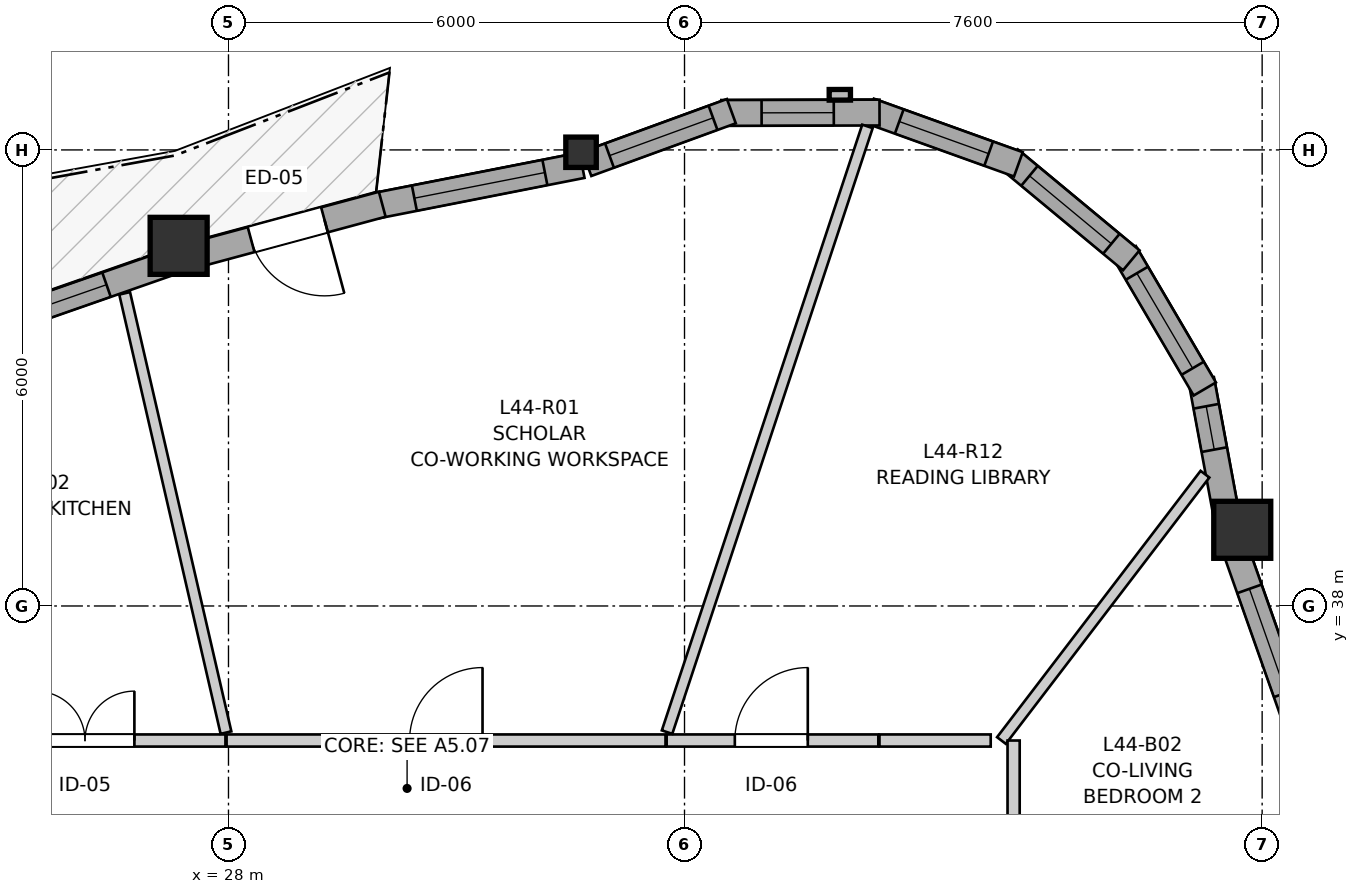
"""IFC4 building model, lengths in metres.
Left out: names, types, materials, properties, quantities, classifications, styles, units other than length and angle.
Written with IfcOpenShell. Run it as: python <this file> out.ifc"""

import sys

from ifc_helpers import new_model, si_unit, direction, frame, frame_2d, origin, origin_2d, place, context, subcontext, project, spatial, rectangle, i_section, extrude, source, transform, mapped, element, fill, save


model = new_model("IFC4")
c1 = context("Model", 3, precision=1e-05, world=origin(), true_north=direction((0.0, 1.0)))
c2 = subcontext(c1, "Body", "Model", "MODEL_VIEW")
j1 = project(units=[si_unit("LENGTHUNIT", "METRE"), si_unit("PLANEANGLEUNIT", "RADIAN")], contexts=[c1])
p1 = place(None, origin())
s1 = spatial("IfcSite", under=j1, at=p1, CompositionType="ELEMENT")
p2 = place(p1, origin())
s2 = spatial("IfcBuilding", under=s1, at=p2, CompositionType="ELEMENT")
p3 = place(p2, frame((0.0, 0.0, 149.0)))
s3 = spatial("IfcBuildingStorey", under=s2, at=p3, CompositionType="ELEMENT", Elevation=149.0)
m1 = source(origin(), c2, "Body", "SweptSolid", [
    extrude(rectangle(XDim=0.75, YDim=0.75, at=origin_2d()), origin(), (0.0, 0.0, 1.0), 2.935),
])
p4 = place(p3, frame((41.338, 39.002, 0.0), z_axis=(0.0, 0.0, 1.0), x_axis=(1.0, 0.0, 0.0)))
e1 = element("IfcColumn", 1, at=p4, inside=s3, PredefinedType="COLUMN", context=c2, shape_type="MappedRepresentation", body=[
    mapped(m1, transform((0.0, 0.0, 0.0), x_axis=(1.0, 0.0, 0.0), y_axis=(0.0, 1.0, 0.0), z_axis=(0.0, 0.0, 1.0), scale=1.0)),
])
m2 = source(origin(), c2, "Body", "SweptSolid", [
    extrude(i_section(OverallWidth=0.401, OverallDepth=0.399, WebThickness=0.023, FlangeThickness=0.036, FilletRadius=0.015, at=origin_2d()), origin(), (0.0, 0.0, 1.0), 2.935),
])
p5 = place(p3, frame((32.639, 43.969, 0.0), z_axis=(0.0, 0.0, 1.0), x_axis=(1.0, 0.0, 0.0)))
e2 = element("IfcColumn", 2, at=p5, inside=s3, PredefinedType="PILASTER", context=c2, shape_type="MappedRepresentation", body=[
    mapped(m2, transform((0.0, 0.0, 0.0), x_axis=(1.0, 0.0, 0.0), y_axis=(0.0, 1.0, 0.0), z_axis=(0.0, 0.0, 1.0), scale=1.0)),
])
p6 = place(p3, frame((27.344, 42.738, 0.0), z_axis=(0.0, 0.0, 1.0), x_axis=(1.0, 0.0, 0.0)))
e3 = element("IfcColumn", 3, at=p6, inside=s3, PredefinedType="COLUMN", context=c2, shape_type="MappedRepresentation", body=[
    mapped(m1, transform((0.0, 0.0, 0.0), x_axis=(1.0, 0.0, 0.0), y_axis=(0.0, 1.0, 0.0), z_axis=(0.0, 0.0, 1.0), scale=1.0)),
])
p7 = place(p3, frame((42.121, 36.274, 0.0), z_axis=(0.0, 0.0, 1.0), x_axis=(-0.332724751299, 0.943023986902, 0.0)))
e4 = element("IfcWall", 4, at=p7, inside=s3, PredefinedType="SOLIDWALL", context=c2, shape_type="SweptSolid", body=[
    extrude(rectangle(XDim=2.678, YDim=0.34, at=frame_2d((1.339, 0.0))), origin(), (0.0, 0.0, 1.0), 2.515),
])
p8 = place(p7, frame((0.619, 0.0, 0.82)))
e5 = element("IfcOpeningElement", 5, at=p8, cuts=e4, PredefinedType="OPENING", context=c2, shape_type="SweptSolid", body=[
    extrude(rectangle(XDim=1.45, YDim=1.25, at=frame_2d((0.725, 0.625))), frame((0.0, 0.18, 0.0), z_axis=(0.0, -1.0, 0.0), x_axis=(1.0, 0.0, 0.0)), (0.0, 0.0, 1.0), 0.36),
])
p9 = place(p3, frame((41.143, 39.124, 0.0), z_axis=(0.0, 0.0, 1.0), x_axis=(-0.182320770307, 0.983239104549, 0.0)))
e6 = element("IfcWall", 6, at=p9, inside=s3, PredefinedType="SOLIDWALL", context=c2, shape_type="SweptSolid", body=[
    extrude(rectangle(XDim=1.888, YDim=0.34, at=frame_2d((0.944, 0.0))), origin(), (0.0, 0.0, 1.0), 2.515),
])
p10 = place(p9, frame((0.949, 0.0, 0.82)))
e7 = element("IfcOpeningElement", 7, at=p10, cuts=e6, PredefinedType="OPENING", context=c2, shape_type="SweptSolid", body=[
    extrude(rectangle(XDim=0.58, YDim=1.35, at=frame_2d((0.29, 0.675))), frame((0.0, 0.18, 0.0), z_axis=(0.0, -1.0, 0.0), x_axis=(1.0, 0.0, 0.0)), (0.0, 0.0, 1.0), 0.36),
])
p11 = place(p3, frame((40.845, 40.855, 0.0), z_axis=(0.0, 0.0, 1.0), x_axis=(-0.506225227923, 0.862401309493, 0.0)))
e8 = element("IfcWall", 8, at=p11, inside=s3, PredefinedType="SOLIDWALL", context=c2, shape_type="SweptSolid", body=[
    extrude(rectangle(XDim=2.081, YDim=0.34, at=frame_2d((1.041, 0.0))), origin(), (0.0, 0.0, 1.0), 2.515),
])
p12 = place(p11, frame((0.316, 0.0, 0.82)))
e9 = element("IfcOpeningElement", 9, at=p12, cuts=e8, PredefinedType="OPENING", context=c2, shape_type="SweptSolid", body=[
    extrude(rectangle(XDim=1.45, YDim=1.25, at=frame_2d((0.725, 0.625))), frame((0.0, 0.18, 0.0), z_axis=(0.0, -1.0, 0.0), x_axis=(1.0, 0.0, 0.0)), (0.0, 0.0, 1.0), 0.36),
])
p13 = place(p3, frame((39.878, 42.548, 0.0), z_axis=(0.0, 0.0, 1.0), x_axis=(-0.769690471148, 0.63841724493, 0.0)))
e10 = element("IfcWall", 10, at=p13, inside=s3, PredefinedType="SOLIDWALL", context=c2, shape_type="SweptSolid", body=[
    extrude(rectangle(XDim=2.081, YDim=0.34, at=frame_2d((1.041, 0.0))), origin(), (0.0, 0.0, 1.0), 2.515),
])
p14 = place(p13, frame((0.341, 0.0, 0.82)))
e11 = element("IfcOpeningElement", 11, at=p14, cuts=e10, PredefinedType="OPENING", context=c2, shape_type="SweptSolid", body=[
    extrude(rectangle(XDim=1.4, YDim=1.35, at=frame_2d((0.7, 0.675))), frame((0.0, 0.18, 0.0), z_axis=(0.0, -1.0, 0.0), x_axis=(1.0, 0.0, 0.0)), (0.0, 0.0, 1.0), 0.36),
])
p15 = place(p3, frame((38.393, 43.81, 0.0), z_axis=(0.0, 0.0, 1.0), x_axis=(-0.941033874027, 0.338312352617, 0.0)))
e12 = element("IfcWall", 12, at=p15, inside=s3, PredefinedType="SOLIDWALL", context=c2, shape_type="SweptSolid", body=[
    extrude(rectangle(XDim=2.081, YDim=0.34, at=frame_2d((1.041, 0.0))), origin(), (0.0, 0.0, 1.0), 2.515),
])
p16 = place(p15, frame((0.416, 0.0, 0.82)))
e13 = element("IfcOpeningElement", 13, at=p16, cuts=e12, PredefinedType="OPENING", context=c2, shape_type="SweptSolid", body=[
    extrude(rectangle(XDim=1.25, YDim=1.35, at=frame_2d((0.625, 0.675))), frame((0.0, 0.18, 0.0), z_axis=(0.0, -1.0, 0.0), x_axis=(1.0, 0.0, 0.0)), (0.0, 0.0, 1.0), 0.36),
])
p17 = place(p3, frame((36.566, 44.491, 0.0), z_axis=(0.0, 0.0, 1.0), x_axis=(-0.999996965984, -0.002463335635, 0.0)))
e14 = element("IfcWall", 14, at=p17, inside=s3, PredefinedType="SOLIDWALL", context=c2, shape_type="SweptSolid", body=[
    extrude(rectangle(XDim=2.081, YDim=0.34, at=frame_2d((1.041, 0.0))), origin(), (0.0, 0.0, 1.0), 2.515),
])
p18 = place(p17, frame((0.602, 0.0, 0.82)))
e15 = element("IfcOpeningElement", 15, at=p18, cuts=e14, PredefinedType="OPENING", context=c2, shape_type="SweptSolid", body=[
    extrude(rectangle(XDim=0.95, YDim=1.35, at=frame_2d((0.475, 0.675))), frame((0.0, 0.18, 0.0), z_axis=(0.0, -1.0, 0.0), x_axis=(1.0, 0.0, 0.0)), (0.0, 0.0, 1.0), 0.36),
])
p19 = place(p3, frame((34.616, 44.51, 0.0), z_axis=(0.0, 0.0, 1.0), x_axis=(-0.939426417976, -0.342750645819, 0.0)))
e16 = element("IfcWall", 16, at=p19, inside=s3, PredefinedType="SOLIDWALL", context=c2, shape_type="SweptSolid", body=[
    extrude(rectangle(XDim=2.023, YDim=0.34, at=frame_2d((1.011, 0.0))), origin(), (0.0, 0.0, 1.0), 2.515),
])
p20 = place(p19, frame((0.257, 0.0, 0.82)))
e17 = element("IfcOpeningElement", 17, at=p20, cuts=e16, PredefinedType="OPENING", context=c2, shape_type="SweptSolid", body=[
    extrude(rectangle(XDim=1.45, YDim=1.25, at=frame_2d((0.725, 0.625))), frame((0.0, 0.18, 0.0), z_axis=(0.0, -1.0, 0.0), x_axis=(1.0, 0.0, 0.0)), (0.0, 0.0, 1.0), 0.36),
])
p21 = place(p3, frame((32.652, 43.799, 0.0), z_axis=(0.0, 0.0, 1.0), x_axis=(-0.98123033563, -0.192839385083, 0.0)))
e18 = element("IfcWall", 18, at=p21, inside=s3, PredefinedType="SOLIDWALL", context=c2, shape_type="SweptSolid", body=[
    extrude(rectangle(XDim=2.766, YDim=0.34, at=frame_2d((1.383, 0.0))), origin(), (0.0, 0.0, 1.0), 2.515),
])
p22 = place(p21, frame((0.498, 0.0, 0.82)))
e19 = element("IfcOpeningElement", 19, at=p22, cuts=e18, PredefinedType="OPENING", context=c2, shape_type="SweptSolid", body=[
    extrude(rectangle(XDim=1.75, YDim=1.3, at=frame_2d((0.875, 0.65))), frame((0.0, 0.18, 0.0), z_axis=(0.0, -1.0, 0.0), x_axis=(1.0, 0.0, 0.0)), (0.0, 0.0, 1.0), 0.36),
])
p23 = place(p3, frame((30.023, 43.285, 0.0), z_axis=(0.0, 0.0, 1.0), x_axis=(-0.965478241218, -0.260483714913, 0.0)))
e20 = element("IfcWall", 20, at=p23, inside=s3, PredefinedType="SOLIDWALL", context=c2, shape_type="SweptSolid", body=[
    extrude(rectangle(XDim=2.574, YDim=0.34, at=frame_2d((1.287, 0.0))), origin(), (0.0, 0.0, 1.0), 2.515),
])
p24 = place(p23, frame((0.787, 0.0, 0.0)))
e21 = element("IfcOpeningElement", 21, at=p24, cuts=e20, PredefinedType="OPENING", context=c2, shape_type="SweptSolid", body=[
    extrude(rectangle(XDim=1.0, YDim=2.1, at=frame_2d((0.5, 1.05))), frame((0.0, 0.18, 0.0), z_axis=(0.0, -1.0, 0.0), x_axis=(1.0, 0.0, 0.0)), (0.0, 0.0, 1.0), 0.36),
])
p25 = place(p3, frame((27.254, 42.527, 0.0), z_axis=(0.0, 0.0, 1.0), x_axis=(-0.944140843313, -0.329542209721, 0.0)))
e22 = element("IfcWall", 22, at=p25, inside=s3, PredefinedType="SOLIDWALL", context=c2, shape_type="SweptSolid", body=[
    extrude(rectangle(XDim=2.53, YDim=0.34, at=frame_2d((1.265, 0.0))), origin(), (0.0, 0.0, 1.0), 2.515),
])
p26 = place(p25, frame((0.909, 0.0, 0.82)))
e23 = element("IfcOpeningElement", 23, at=p26, cuts=e22, PredefinedType="OPENING", context=c2, shape_type="SweptSolid", body=[
    extrude(rectangle(XDim=1.35, YDim=1.45, at=frame_2d((0.675, 0.725))), frame((0.0, 0.18, 0.0), z_axis=(0.0, -1.0, 0.0), x_axis=(1.0, 0.0, 0.0)), (0.0, 0.0, 1.0), 0.36),
])
p27 = place(p3, frame((27.975, 36.23, 0.0), z_axis=(0.0, 0.0, 1.0), x_axis=(1.0, 0.0, 0.0)))
e24 = element("IfcWall", 24, at=p27, inside=s3, PredefinedType="PARTITIONING", context=c2, shape_type="SweptSolid", body=[
    extrude(rectangle(XDim=5.775, YDim=0.16, at=frame_2d((2.887, 0.0))), origin(), (0.0, 0.0, 1.0), 2.573),
])
p28 = place(p27, frame((2.407, 0.0, 0.0)))
e25 = element("IfcOpeningElement", 25, at=p28, cuts=e24, PredefinedType="OPENING", context=c2, shape_type="SweptSolid", body=[
    extrude(rectangle(XDim=0.96, YDim=2.1, at=frame_2d((0.48, 1.05))), frame((0.0, 0.09, 0.0), z_axis=(0.0, -1.0, 0.0), x_axis=(1.0, 0.0, 0.0)), (0.0, 0.0, 1.0), 0.18),
])
p29 = place(p3, frame((24.215, 36.23, 0.0), z_axis=(0.0, 0.0, 1.0), x_axis=(1.0, 0.0, 0.0)))
e26 = element("IfcWall", 26, at=p29, inside=s3, PredefinedType="PARTITIONING", context=c2, shape_type="SweptSolid", body=[
    extrude(rectangle(XDim=3.745, YDim=0.16, at=frame_2d((1.873, 0.0))), origin(), (0.0, 0.0, 1.0), 2.935),
])
p30 = place(p29, frame((1.247, 0.0, 0.0)))
e27 = element("IfcOpeningElement", 27, at=p30, cuts=e26, PredefinedType="OPENING", context=c2, shape_type="SweptSolid", body=[
    extrude(rectangle(XDim=1.3, YDim=2.1, at=frame_2d((0.65, 1.05))), frame((0.0, 0.09, 0.0), z_axis=(0.0, -1.0, 0.0), x_axis=(1.0, 0.0, 0.0)), (0.0, 0.0, 1.0), 0.18),
])
p31 = place(p3, frame((33.765, 36.23, 0.0), z_axis=(0.0, 0.0, 1.0), x_axis=(1.0, 0.0, 0.0)))
e28 = element("IfcWall", 28, at=p31, inside=s3, PredefinedType="PARTITIONING", context=c2, shape_type="SweptSolid", body=[
    extrude(rectangle(XDim=2.785, YDim=0.16, at=frame_2d((1.393, 0.0))), origin(), (0.0, 0.0, 1.0), 2.573),
])
p32 = place(p31, frame((0.897, 0.0, 0.0)))
e29 = element("IfcOpeningElement", 29, at=p32, cuts=e28, PredefinedType="OPENING", context=c2, shape_type="SweptSolid", body=[
    extrude(rectangle(XDim=0.96, YDim=2.1, at=frame_2d((0.48, 1.05))), frame((0.0, 0.09, 0.0), z_axis=(0.0, -1.0, 0.0), x_axis=(1.0, 0.0, 0.0)), (0.0, 0.0, 1.0), 0.18),
])
p33 = place(p3, frame((33.771, 36.34, 0.0), z_axis=(0.0, 0.0, 1.0), x_axis=(0.314080540859, 0.949396341816, 0.0)))
e30 = element("IfcWall", 30, at=p33, inside=s3, PredefinedType="PARTITIONING", context=c2, shape_type="SweptSolid", body=[
    extrude(rectangle(XDim=8.394, YDim=0.145, at=frame_2d((4.197, 0.0))), origin(), (0.0, 0.0, 1.0), 2.935),
])
p34 = place(p3, frame((26.634, 42.113, 0.0), z_axis=(0.0, 0.0, 1.0), x_axis=(0.224790361783, -0.97440714963, 0.0)))
e31 = element("IfcWall", 31, at=p34, inside=s3, PredefinedType="PARTITIONING", context=c2, shape_type="SweptSolid", body=[
    extrude(rectangle(XDim=5.931, YDim=0.145, at=frame_2d((2.966, 0.0))), origin(), (0.0, 0.0, 1.0), 2.935),
])
p35 = place(p3, frame((38.17, 36.23, 0.0), z_axis=(0.0, 0.0, 1.0), x_axis=(0.607203490548, 0.794546361811, 0.0)))
e32 = element("IfcWall", 32, at=p35, inside=s3, PredefinedType="PARTITIONING", context=c2, shape_type="SweptSolid", body=[
    extrude(rectangle(XDim=4.41, YDim=0.145, at=frame_2d((2.205, 0.0))), origin(), (0.0, 0.0, 1.0), 2.935),
])
p36 = place(p3, frame((38.33, 34.465, 0.0), z_axis=(0.0, 0.0, 1.0), x_axis=(0.0, 1.0, 0.0)))
e33 = element("IfcWall", 33, at=p36, inside=s3, PredefinedType="PARTITIONING", context=c2, shape_type="SweptSolid", body=[
    extrude(rectangle(XDim=1.765, YDim=0.16, at=frame_2d((0.882, 0.0))), origin(), (0.0, 0.0, 1.0), 2.573),
])
p37 = place(p3, frame((36.565, 36.23, 0.0), z_axis=(0.0, 0.0, 1.0), x_axis=(1.0, 0.0, 0.0)))
e34 = element("IfcWall", 34, at=p37, inside=s3, PredefinedType="PARTITIONING", context=c2, shape_type="SweptSolid", body=[
    extrude(rectangle(XDim=1.464, YDim=0.16, at=frame_2d((0.732, 0.0))), origin(), (0.0, 0.0, 1.0), 2.935),
])
m3 = source(origin(), c2, "Body", "SweptSolid", [
    extrude(rectangle(XDim=1.45, YDim=1.25, at=frame_2d((0.725, 0.625))), frame((0.0, 0.03, 0.0), z_axis=(0.0, -1.0, 0.0), x_axis=(1.0, 0.0, 0.0)), (0.0, 0.0, 1.0), 0.06),
])
p38 = place(p8, origin())
e35 = element("IfcWindow", 35, at=p38, inside=s3, PartitioningType="SINGLE_PANEL", PredefinedType="WINDOW", context=c2, shape_type="MappedRepresentation", body=[
    mapped(m3, transform((0.0, 0.0, 0.0), x_axis=(1.0, 0.0, 0.0), y_axis=(0.0, 1.0, 0.0), z_axis=(0.0, 0.0, 1.0), scale=1.0)),
])
fill(e5, e35)
m4 = source(origin(), c2, "Body", "SweptSolid", [
    extrude(rectangle(XDim=0.58, YDim=1.35, at=frame_2d((0.29, 0.675))), frame((0.0, 0.03, 0.0), z_axis=(0.0, -1.0, 0.0), x_axis=(1.0, 0.0, 0.0)), (0.0, 0.0, 1.0), 0.06),
])
p39 = place(p10, origin())
e36 = element("IfcWindow", 36, at=p39, inside=s3, PartitioningType="SINGLE_PANEL", PredefinedType="WINDOW", context=c2, shape_type="MappedRepresentation", body=[
    mapped(m4, transform((0.0, 0.0, 0.0), x_axis=(1.0, 0.0, 0.0), y_axis=(0.0, 1.0, 0.0), z_axis=(0.0, 0.0, 1.0), scale=1.0)),
])
fill(e7, e36)
p40 = place(p12, origin())
e37 = element("IfcWindow", 37, at=p40, inside=s3, PartitioningType="SINGLE_PANEL", PredefinedType="WINDOW", context=c2, shape_type="MappedRepresentation", body=[
    mapped(m3, transform((0.0, 0.0, 0.0), x_axis=(1.0, 0.0, 0.0), y_axis=(0.0, 1.0, 0.0), z_axis=(0.0, 0.0, 1.0), scale=1.0)),
])
fill(e9, e37)
m5 = source(origin(), c2, "Body", "SweptSolid", [
    extrude(rectangle(XDim=1.4, YDim=1.35, at=frame_2d((0.7, 0.675))), frame((0.0, 0.03, 0.0), z_axis=(0.0, -1.0, 0.0), x_axis=(1.0, 0.0, 0.0)), (0.0, 0.0, 1.0), 0.06),
])
p41 = place(p14, origin())
e38 = element("IfcWindow", 38, at=p41, inside=s3, PartitioningType="SINGLE_PANEL", PredefinedType="WINDOW", context=c2, shape_type="MappedRepresentation", body=[
    mapped(m5, transform((0.0, 0.0, 0.0), x_axis=(1.0, 0.0, 0.0), y_axis=(0.0, 1.0, 0.0), z_axis=(0.0, 0.0, 1.0), scale=1.0)),
])
fill(e11, e38)
m6 = source(origin(), c2, "Body", "SweptSolid", [
    extrude(rectangle(XDim=1.25, YDim=1.35, at=frame_2d((0.625, 0.675))), frame((0.0, 0.03, 0.0), z_axis=(0.0, -1.0, 0.0), x_axis=(1.0, 0.0, 0.0)), (0.0, 0.0, 1.0), 0.06),
])
p42 = place(p16, origin())
e39 = element("IfcWindow", 39, at=p42, inside=s3, PartitioningType="SINGLE_PANEL", PredefinedType="WINDOW", context=c2, shape_type="MappedRepresentation", body=[
    mapped(m6, transform((0.0, 0.0, 0.0), x_axis=(1.0, 0.0, 0.0), y_axis=(0.0, 1.0, 0.0), z_axis=(0.0, 0.0, 1.0), scale=1.0)),
])
fill(e13, e39)
m7 = source(origin(), c2, "Body", "SweptSolid", [
    extrude(rectangle(XDim=0.95, YDim=1.35, at=frame_2d((0.475, 0.675))), frame((0.0, 0.03, 0.0), z_axis=(0.0, -1.0, 0.0), x_axis=(1.0, 0.0, 0.0)), (0.0, 0.0, 1.0), 0.06),
])
p43 = place(p18, origin())
e40 = element("IfcWindow", 40, at=p43, inside=s3, PartitioningType="SINGLE_PANEL", PredefinedType="WINDOW", context=c2, shape_type="MappedRepresentation", body=[
    mapped(m7, transform((0.0, 0.0, 0.0), x_axis=(1.0, 0.0, 0.0), y_axis=(0.0, 1.0, 0.0), z_axis=(0.0, 0.0, 1.0), scale=1.0)),
])
fill(e15, e40)
p44 = place(p20, origin())
e41 = element("IfcWindow", 41, at=p44, inside=s3, PartitioningType="SINGLE_PANEL", PredefinedType="WINDOW", context=c2, shape_type="MappedRepresentation", body=[
    mapped(m3, transform((0.0, 0.0, 0.0), x_axis=(1.0, 0.0, 0.0), y_axis=(0.0, 1.0, 0.0), z_axis=(0.0, 0.0, 1.0), scale=1.0)),
])
fill(e17, e41)
m8 = source(origin(), c2, "Body", "SweptSolid", [
    extrude(rectangle(XDim=1.75, YDim=1.3, at=frame_2d((0.875, 0.65))), frame((0.0, 0.03, 0.0), z_axis=(0.0, -1.0, 0.0), x_axis=(1.0, 0.0, 0.0)), (0.0, 0.0, 1.0), 0.06),
])
p45 = place(p22, origin())
e42 = element("IfcWindow", 42, at=p45, inside=s3, PartitioningType="SINGLE_PANEL", PredefinedType="WINDOW", context=c2, shape_type="MappedRepresentation", body=[
    mapped(m8, transform((0.0, 0.0, 0.0), x_axis=(1.0, 0.0, 0.0), y_axis=(0.0, 1.0, 0.0), z_axis=(0.0, 0.0, 1.0), scale=1.0)),
])
fill(e19, e42)
m9 = source(origin(), c2, "Body", "SweptSolid", [
    extrude(rectangle(XDim=1.35, YDim=1.45, at=frame_2d((0.675, 0.725))), frame((0.0, 0.03, 0.0), z_axis=(0.0, -1.0, 0.0), x_axis=(1.0, 0.0, 0.0)), (0.0, 0.0, 1.0), 0.06),
])
p46 = place(p26, origin())
e43 = element("IfcWindow", 43, at=p46, inside=s3, PartitioningType="SINGLE_PANEL", PredefinedType="WINDOW", context=c2, shape_type="MappedRepresentation", body=[
    mapped(m9, transform((0.0, 0.0, 0.0), x_axis=(1.0, 0.0, 0.0), y_axis=(0.0, 1.0, 0.0), z_axis=(0.0, 0.0, 1.0), scale=1.0)),
])
fill(e23, e43)
m10 = source(origin(), c2, "Body", "SweptSolid", [
    extrude(rectangle(XDim=1.0, YDim=2.1, at=frame_2d((0.5, 1.05))), frame((0.0, 0.025, 0.0), z_axis=(0.0, -1.0, 0.0), x_axis=(1.0, 0.0, 0.0)), (0.0, 0.0, 1.0), 0.05),
])
p47 = place(p24, origin())
e44 = element("IfcDoor", 44, at=p47, inside=s3, OperationType="SINGLE_SWING_LEFT", PredefinedType="DOOR", context=c2, shape_type="MappedRepresentation", body=[
    mapped(m10, transform((0.0, 0.0, 0.0), x_axis=(1.0, 0.0, 0.0), y_axis=(0.0, 1.0, 0.0), z_axis=(0.0, 0.0, 1.0), scale=1.0)),
])
fill(e21, e44)
m11 = source(origin(), c2, "Body", "SweptSolid", [
    extrude(rectangle(XDim=0.96, YDim=2.1, at=frame_2d((0.48, 1.05))), frame((0.0, 0.025, 0.0), z_axis=(0.0, -1.0, 0.0), x_axis=(1.0, 0.0, 0.0)), (0.0, 0.0, 1.0), 0.05),
])
p48 = place(p28, origin())
e45 = element("IfcDoor", 45, at=p48, inside=s3, OperationType="SINGLE_SWING_RIGHT", PredefinedType="DOOR", context=c2, shape_type="MappedRepresentation", body=[
    mapped(m11, transform((0.0, 0.0, 0.0), x_axis=(1.0, 0.0, 0.0), y_axis=(0.0, 1.0, 0.0), z_axis=(0.0, 0.0, 1.0), scale=1.0)),
])
fill(e25, e45)
m12 = source(origin(), c2, "Body", "SweptSolid", [
    extrude(rectangle(XDim=1.3, YDim=2.1, at=frame_2d((0.65, 1.05))), frame((0.0, 0.025, 0.0), z_axis=(0.0, -1.0, 0.0), x_axis=(1.0, 0.0, 0.0)), (0.0, 0.0, 1.0), 0.05),
])
p49 = place(p30, origin())
e46 = element("IfcDoor", 46, at=p49, inside=s3, OperationType="DOUBLE_DOOR_SINGLE_SWING", PredefinedType="DOOR", context=c2, shape_type="MappedRepresentation", body=[
    mapped(m12, transform((0.0, 0.0, 0.0), x_axis=(1.0, 0.0, 0.0), y_axis=(0.0, 1.0, 0.0), z_axis=(0.0, 0.0, 1.0), scale=1.0)),
])
fill(e27, e46)
p50 = place(p32, origin())
e47 = element("IfcDoor", 47, at=p50, inside=s3, OperationType="SINGLE_SWING_RIGHT", PredefinedType="DOOR", context=c2, shape_type="MappedRepresentation", body=[
    mapped(m11, transform((0.0, 0.0, 0.0), x_axis=(1.0, 0.0, 0.0), y_axis=(0.0, 1.0, 0.0), z_axis=(0.0, 0.0, 1.0), scale=1.0)),
])
fill(e29, e47)
save(model, sys.argv[1])
